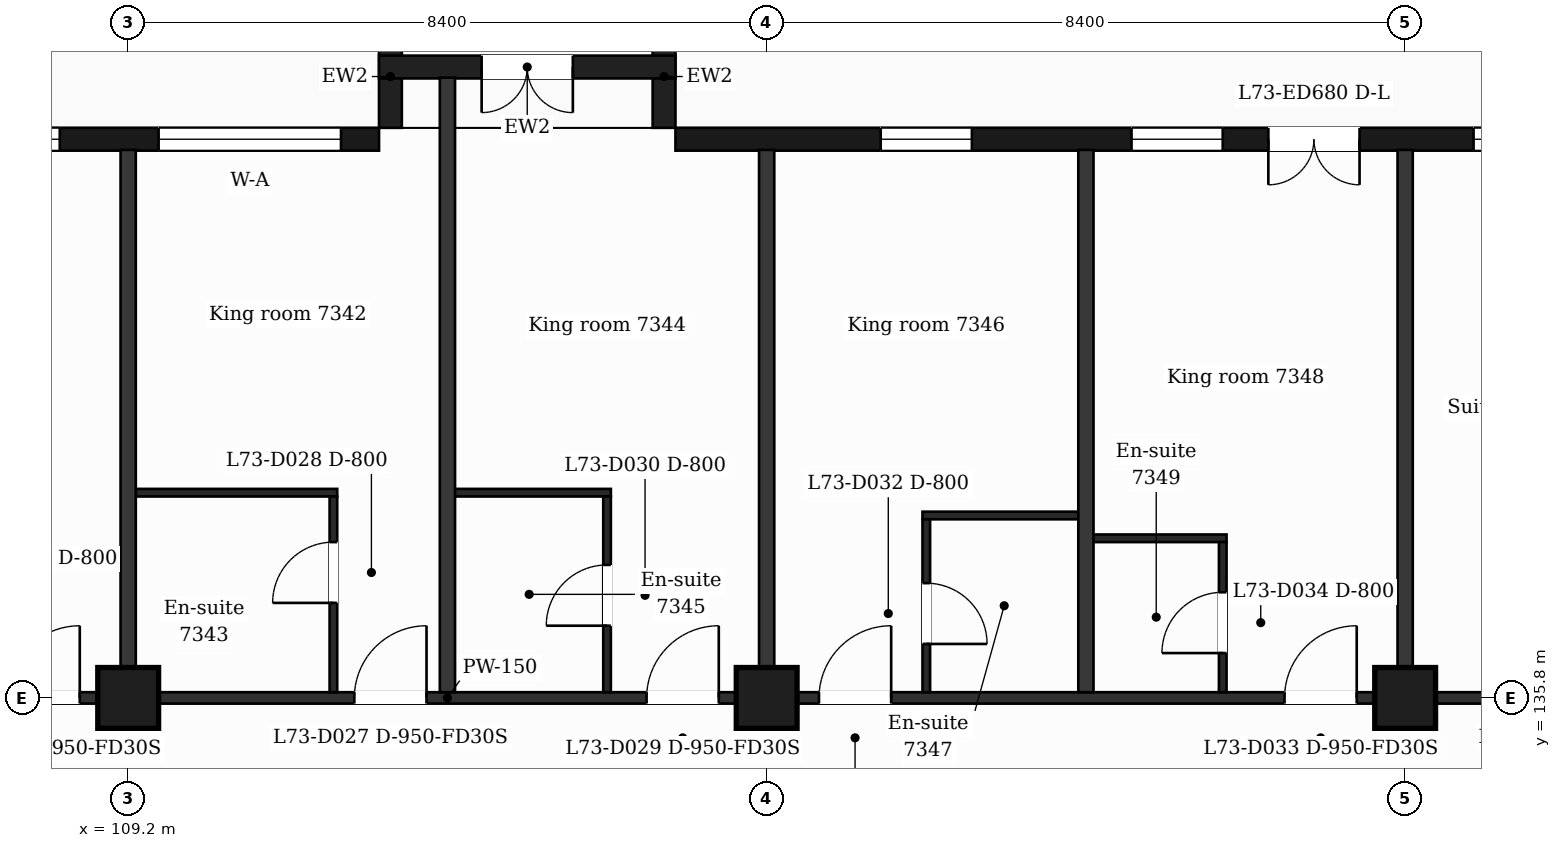
"""IFC4 building model, lengths in metres.
Left out: names, types, materials, properties, quantities, classifications, styles, units other than length and angle.
Written with IfcOpenShell. Run it as: python <this file> out.ifc"""

import sys

from ifc_helpers import new_model, si_unit, direction, frame, frame_2d, origin, origin_2d, place, context, subcontext, project, spatial, rectangle, extrude, element, fill, save


model = new_model("IFC4")
c1 = context("Model", 3, precision=1e-05, world=origin(), true_north=direction((0.0, 1.0)))
c2 = subcontext(c1, "Body", "Model", "MODEL_VIEW")
j1 = project(units=[si_unit("LENGTHUNIT", "METRE"), si_unit("PLANEANGLEUNIT", "RADIAN")], contexts=[c1])
p1 = place(None, origin())
s1 = spatial("IfcSite", under=j1, at=p1, CompositionType="ELEMENT")
p2 = place(p1, origin())
s2 = spatial("IfcBuilding", under=s1, at=p2, CompositionType="ELEMENT")
p3 = place(p2, frame((0.0, 0.0, 299.7)))
s3 = spatial("IfcBuildingStorey", under=s2, at=p3, CompositionType="ELEMENT", Elevation=299.7)
for number, where, z_axis, x_axis in (
    (1, (109.2, 135.8, 0.0), (0.0, 0.0, 1.0), (1.0, 0.0, 0.0)),
    (2, (117.6, 135.8, 0.0), (0.0, 0.0, 1.0), (1.0, 0.0, 0.0)),
    (3, (126.0, 135.8, 0.0), (0.0, 0.0, 1.0), (1.0, 0.0, 0.0)),
):
    element("IfcColumn", number, at=place(p3, frame(where, z_axis=z_axis, x_axis=x_axis)), inside=s3, PredefinedType="COLUMN", context=c2, shape_type="SweptSolid", body=[
        extrude(rectangle(XDim=0.8, YDim=0.8, at=origin_2d()), origin(), (0.0, 0.0, 1.0), 3.7),
    ])
p4 = place(p3, frame((130.65, 143.15, 0.0), z_axis=(0.0, 0.0, 1.0), x_axis=(-1.0, 0.0, 0.0)))
e4 = element("IfcWall", 4, at=p4, inside=s3, PredefinedType="SOLIDWALL", context=c2, shape_type="SweptSolid", body=[
    extrude(rectangle(XDim=14.25, YDim=0.3, at=frame_2d((7.125, 0.0))), origin(), (0.0, 0.0, 1.0), 3.25),
])
p5 = place(p4, frame((1.35, 0.0, 0.9)))
e5 = element("IfcOpeningElement", 5, at=p5, cuts=e4, PredefinedType="OPENING", context=c2, shape_type="SweptSolid", body=[
    extrude(rectangle(XDim=2.4, YDim=2.1, at=frame_2d((1.2, 1.05))), frame((0.0, 0.16, 0.0), z_axis=(0.0, -1.0, 0.0), x_axis=(1.0, 0.0, 0.0)), (0.0, 0.0, 1.0), 0.32),
])
p6 = place(p4, frame((5.25, 0.0, 0.0)))
e6 = element("IfcOpeningElement", 6, at=p6, cuts=e4, PredefinedType="OPENING", context=c2, shape_type="SweptSolid", body=[
    extrude(rectangle(XDim=1.2, YDim=2.4, at=frame_2d((0.6, 1.2))), frame((0.0, 0.16, 0.0), z_axis=(0.0, -1.0, 0.0), x_axis=(1.0, 0.0, 0.0)), (0.0, 0.0, 1.0), 0.32),
])
p7 = place(p4, frame((7.05, 0.0, 0.9)))
e7 = element("IfcOpeningElement", 7, at=p7, cuts=e4, PredefinedType="OPENING", context=c2, shape_type="SweptSolid", body=[
    extrude(rectangle(XDim=1.2, YDim=2.1, at=frame_2d((0.6, 1.05))), frame((0.0, 0.16, 0.0), z_axis=(0.0, -1.0, 0.0), x_axis=(1.0, 0.0, 0.0)), (0.0, 0.0, 1.0), 0.32),
])
p8 = place(p4, frame((10.35, 0.0, 0.9)))
e8 = element("IfcOpeningElement", 8, at=p8, cuts=e4, PredefinedType="OPENING", context=c2, shape_type="SweptSolid", body=[
    extrude(rectangle(XDim=1.2, YDim=2.1, at=frame_2d((0.6, 1.05))), frame((0.0, 0.16, 0.0), z_axis=(0.0, -1.0, 0.0), x_axis=(1.0, 0.0, 0.0)), (0.0, 0.0, 1.0), 0.32),
])
p9 = place(p3, frame((112.5, 143.15, 0.0), z_axis=(0.0, 0.0, 1.0), x_axis=(-1.0, 0.0, 0.0)))
e9 = element("IfcWall", 9, at=p9, inside=s3, PredefinedType="SOLIDWALL", context=c2, shape_type="SweptSolid", body=[
    extrude(rectangle(XDim=16.5, YDim=0.3, at=frame_2d((8.25, 0.0))), origin(), (0.0, 0.0, 1.0), 3.25),
])
p10 = place(p9, frame((0.5, 0.0, 0.9)))
e10 = element("IfcOpeningElement", 10, at=p10, cuts=e9, PredefinedType="OPENING", context=c2, shape_type="SweptSolid", body=[
    extrude(rectangle(XDim=2.4, YDim=2.1, at=frame_2d((1.2, 1.05))), frame((0.0, 0.16, 0.0), z_axis=(0.0, -1.0, 0.0), x_axis=(1.0, 0.0, 0.0)), (0.0, 0.0, 1.0), 0.32),
])
p11 = place(p9, frame((4.2, 0.0, 0.9)))
e11 = element("IfcOpeningElement", 11, at=p11, cuts=e9, PredefinedType="OPENING", context=c2, shape_type="SweptSolid", body=[
    extrude(rectangle(XDim=2.4, YDim=2.1, at=frame_2d((1.2, 1.05))), frame((0.0, 0.16, 0.0), z_axis=(0.0, -1.0, 0.0), x_axis=(1.0, 0.0, 0.0)), (0.0, 0.0, 1.0), 0.32),
])
p12 = place(p9, frame((9.0, 0.0, 0.0)))
e12 = element("IfcOpeningElement", 12, at=p12, cuts=e9, PredefinedType="OPENING", context=c2, shape_type="SweptSolid", body=[
    extrude(rectangle(XDim=1.2, YDim=2.4, at=frame_2d((0.6, 1.2))), frame((0.0, 0.16, 0.0), z_axis=(0.0, -1.0, 0.0), x_axis=(1.0, 0.0, 0.0)), (0.0, 0.0, 1.0), 0.32),
])
p13 = place(p9, frame((12.6, 0.0, 0.9)))
e13 = element("IfcOpeningElement", 13, at=p13, cuts=e9, PredefinedType="OPENING", context=c2, shape_type="SweptSolid", body=[
    extrude(rectangle(XDim=2.4, YDim=2.1, at=frame_2d((1.2, 1.05))), frame((0.0, 0.16, 0.0), z_axis=(0.0, -1.0, 0.0), x_axis=(1.0, 0.0, 0.0)), (0.0, 0.0, 1.0), 0.32),
])
for number, where, z_axis, x_axis in (
    (14, (116.25, 143.3, 0.0), (0.0, 0.0, 1.0), (0.0, 1.0, 0.0)),
    (15, (112.65, 143.3, 0.0), (0.0, 0.0, 1.0), (0.0, 1.0, 0.0)),
):
    element("IfcWall", number, at=place(p3, frame(where, z_axis=z_axis, x_axis=x_axis)), inside=s3, PredefinedType="SOLIDWALL", context=c2, shape_type="SweptSolid", body=[
        extrude(rectangle(XDim=1.35, YDim=0.3, at=frame_2d((0.675, 0.0))), origin(), (0.0, 0.0, 1.0), 3.25),
    ])
p14 = place(p3, frame((116.4, 144.1, 0.0), z_axis=(0.0, 0.0, 1.0), x_axis=(-1.0, 0.0, 0.0)))
e16 = element("IfcWall", 16, at=p14, inside=s3, PredefinedType="SOLIDWALL", context=c2, shape_type="SweptSolid", body=[
    extrude(rectangle(XDim=3.9, YDim=0.3, at=frame_2d((1.95, 0.0))), origin(), (0.0, 0.0, 1.0), 3.25),
])
p15 = place(p14, frame((1.35, 0.0, 0.0)))
e17 = element("IfcOpeningElement", 17, at=p15, cuts=e16, PredefinedType="OPENING", context=c2, shape_type="SweptSolid", body=[
    extrude(rectangle(XDim=1.2, YDim=2.4, at=frame_2d((0.6, 1.2))), frame((0.0, 0.16, 0.0), z_axis=(0.0, -1.0, 0.0), x_axis=(1.0, 0.0, 0.0)), (0.0, 0.0, 1.0), 0.32),
])
p16 = place(p3, frame((90.895, 135.8, 0.0), z_axis=(0.0, 0.0, 1.0), x_axis=(1.0, 0.0, 0.0)))
e18 = element("IfcWall", 18, at=p16, inside=s3, PredefinedType="PARTITIONING", context=c2, shape_type="SweptSolid", body=[
    extrude(rectangle(XDim=45.011, YDim=0.15, at=frame_2d((22.505, 0.0))), origin(), (0.0, 0.0, 1.0), 3.25),
])
p17 = place(p16, frame((6.906, 0.0, 0.0)))
e19 = element("IfcOpeningElement", 19, at=p17, cuts=e18, PredefinedType="OPENING", context=c2, shape_type="SweptSolid", body=[
    extrude(rectangle(XDim=1.0, YDim=2.1, at=frame_2d((0.5, 1.05))), frame((0.0, 0.085, 0.0), z_axis=(0.0, -1.0, 0.0), x_axis=(1.0, 0.0, 0.0)), (0.0, 0.0, 1.0), 0.17),
])
p18 = place(p16, frame((10.555, 0.0, 0.0)))
e20 = element("IfcOpeningElement", 20, at=p18, cuts=e18, PredefinedType="OPENING", context=c2, shape_type="SweptSolid", body=[
    extrude(rectangle(XDim=1.0, YDim=2.1, at=frame_2d((0.5, 1.05))), frame((0.0, 0.085, 0.0), z_axis=(0.0, -1.0, 0.0), x_axis=(1.0, 0.0, 0.0)), (0.0, 0.0, 1.0), 0.17),
])
p19 = place(p16, frame((16.719, 0.0, 0.0)))
e21 = element("IfcOpeningElement", 21, at=p19, cuts=e18, PredefinedType="OPENING", context=c2, shape_type="SweptSolid", body=[
    extrude(rectangle(XDim=0.95, YDim=2.1, at=frame_2d((0.475, 1.05))), frame((0.0, 0.085, 0.0), z_axis=(0.0, -1.0, 0.0), x_axis=(1.0, 0.0, 0.0)), (0.0, 0.0, 1.0), 0.17),
])
p20 = place(p16, frame((21.281, 0.0, 0.0)))
e22 = element("IfcOpeningElement", 22, at=p20, cuts=e18, PredefinedType="OPENING", context=c2, shape_type="SweptSolid", body=[
    extrude(rectangle(XDim=0.95, YDim=2.1, at=frame_2d((0.475, 1.05))), frame((0.0, 0.085, 0.0), z_axis=(0.0, -1.0, 0.0), x_axis=(1.0, 0.0, 0.0)), (0.0, 0.0, 1.0), 0.17),
])
p21 = place(p16, frame((25.125, 0.0, 0.0)))
e23 = element("IfcOpeningElement", 23, at=p21, cuts=e18, PredefinedType="OPENING", context=c2, shape_type="SweptSolid", body=[
    extrude(rectangle(XDim=0.95, YDim=2.1, at=frame_2d((0.475, 1.05))), frame((0.0, 0.085, 0.0), z_axis=(0.0, -1.0, 0.0), x_axis=(1.0, 0.0, 0.0)), (0.0, 0.0, 1.0), 0.17),
])
p22 = place(p16, frame((27.393, 0.0, 0.0)))
e24 = element("IfcOpeningElement", 24, at=p22, cuts=e18, PredefinedType="OPENING", context=c2, shape_type="SweptSolid", body=[
    extrude(rectangle(XDim=0.95, YDim=2.1, at=frame_2d((0.475, 1.05))), frame((0.0, 0.085, 0.0), z_axis=(0.0, -1.0, 0.0), x_axis=(1.0, 0.0, 0.0)), (0.0, 0.0, 1.0), 0.17),
])
p23 = place(p16, frame((33.518, 0.0, 0.0)))
e25 = element("IfcOpeningElement", 25, at=p23, cuts=e18, PredefinedType="OPENING", context=c2, shape_type="SweptSolid", body=[
    extrude(rectangle(XDim=0.95, YDim=2.1, at=frame_2d((0.475, 1.05))), frame((0.0, 0.085, 0.0), z_axis=(0.0, -1.0, 0.0), x_axis=(1.0, 0.0, 0.0)), (0.0, 0.0, 1.0), 0.17),
])
p24 = place(p16, frame((37.195, 0.0, 0.0)))
e26 = element("IfcOpeningElement", 26, at=p24, cuts=e18, PredefinedType="OPENING", context=c2, shape_type="SweptSolid", body=[
    extrude(rectangle(XDim=1.0, YDim=2.1, at=frame_2d((0.5, 1.05))), frame((0.0, 0.085, 0.0), z_axis=(0.0, -1.0, 0.0), x_axis=(1.0, 0.0, 0.0)), (0.0, 0.0, 1.0), 0.17),
])
p25 = place(p3, frame((121.8, 137.9, 0.0), z_axis=(0.0, 0.0, 1.0), x_axis=(1.0, 0.0, 0.0)))
e27 = element("IfcWall", 27, at=p25, inside=s3, PredefinedType="PARTITIONING", context=c2, shape_type="SweptSolid", body=[
    extrude(rectangle(XDim=1.85, YDim=0.1, at=frame_2d((0.925, 0.0))), origin(), (0.0, 0.0, 1.0), 3.25),
])
p26 = place(p3, frame((119.65, 138.2, 0.0), z_axis=(0.0, 0.0, 1.0), x_axis=(1.0, 0.0, 0.0)))
e28 = element("IfcWall", 28, at=p26, inside=s3, PredefinedType="PARTITIONING", context=c2, shape_type="SweptSolid", body=[
    extrude(rectangle(XDim=2.15, YDim=0.1, at=frame_2d((1.075, 0.0))), origin(), (0.0, 0.0, 1.0), 3.25),
])
p27 = place(p3, frame((109.2, 138.5, 0.0), z_axis=(0.0, 0.0, 1.0), x_axis=(1.0, 0.0, 0.0)))
e29 = element("IfcWall", 29, at=p27, inside=s3, PredefinedType="PARTITIONING", context=c2, shape_type="SweptSolid", body=[
    extrude(rectangle(XDim=2.75, YDim=0.1, at=frame_2d((1.375, 0.0))), origin(), (0.0, 0.0, 1.0), 3.25),
])
p28 = place(p3, frame((113.4, 138.5, 0.0), z_axis=(0.0, 0.0, 1.0), x_axis=(1.0, 0.0, 0.0)))
e30 = element("IfcWall", 30, at=p28, inside=s3, PredefinedType="PARTITIONING", context=c2, shape_type="SweptSolid", body=[
    extrude(rectangle(XDim=2.15, YDim=0.1, at=frame_2d((1.075, 0.0))), origin(), (0.0, 0.0, 1.0), 3.25),
])
p29 = place(p3, frame((109.2, 135.875, 0.0), z_axis=(0.0, 0.0, 1.0), x_axis=(0.0, 1.0, 0.0)))
e31 = element("IfcWall", 31, at=p29, inside=s3, PredefinedType="PARTITIONING", context=c2, shape_type="SweptSolid", body=[
    extrude(rectangle(XDim=7.135, YDim=0.2, at=frame_2d((3.567, 0.0))), origin(), (0.0, 0.0, 1.0), 3.25),
])
p30 = place(p3, frame((111.9, 135.875, 0.0), z_axis=(0.0, 0.0, 1.0), x_axis=(0.0, 1.0, 0.0)))
e32 = element("IfcWall", 32, at=p30, inside=s3, PredefinedType="PARTITIONING", context=c2, shape_type="SweptSolid", body=[
    extrude(rectangle(XDim=2.575, YDim=0.1, at=frame_2d((1.288, 0.0))), origin(), (0.0, 0.0, 1.0), 3.25),
])
p31 = place(p30, frame((1.175, 0.0, 0.0)))
e33 = element("IfcOpeningElement", 33, at=p31, cuts=e32, PredefinedType="OPENING", context=c2, shape_type="SweptSolid", body=[
    extrude(rectangle(XDim=0.8, YDim=2.1, at=frame_2d((0.4, 1.05))), frame((0.0, 0.06, 0.0), z_axis=(0.0, -1.0, 0.0), x_axis=(1.0, 0.0, 0.0)), (0.0, 0.0, 1.0), 0.12),
])
p32 = place(p3, frame((113.4, 135.875, 0.0), z_axis=(0.0, 0.0, 1.0), x_axis=(0.0, 1.0, 0.0)))
e34 = element("IfcWall", 34, at=p32, inside=s3, PredefinedType="PARTITIONING", context=c2, shape_type="SweptSolid", body=[
    extrude(rectangle(XDim=8.085, YDim=0.2, at=frame_2d((4.042, 0.0))), origin(), (0.0, 0.0, 1.0), 3.25),
])
p33 = place(p3, frame((115.5, 135.875, 0.0), z_axis=(0.0, 0.0, 1.0), x_axis=(0.0, 1.0, 0.0)))
e35 = element("IfcWall", 35, at=p33, inside=s3, PredefinedType="PARTITIONING", context=c2, shape_type="SweptSolid", body=[
    extrude(rectangle(XDim=2.575, YDim=0.1, at=frame_2d((1.288, 0.0))), origin(), (0.0, 0.0, 1.0), 3.25),
])
p34 = place(p33, frame((0.875, 0.0, 0.0)))
e36 = element("IfcOpeningElement", 36, at=p34, cuts=e35, PredefinedType="OPENING", context=c2, shape_type="SweptSolid", body=[
    extrude(rectangle(XDim=0.8, YDim=2.1, at=frame_2d((0.4, 1.05))), frame((0.0, 0.06, 0.0), z_axis=(0.0, -1.0, 0.0), x_axis=(1.0, 0.0, 0.0)), (0.0, 0.0, 1.0), 0.12),
])
p35 = place(p3, frame((117.6, 135.875, 0.0), z_axis=(0.0, 0.0, 1.0), x_axis=(0.0, 1.0, 0.0)))
e37 = element("IfcWall", 37, at=p35, inside=s3, PredefinedType="PARTITIONING", context=c2, shape_type="SweptSolid", body=[
    extrude(rectangle(XDim=7.135, YDim=0.2, at=frame_2d((3.567, 0.0))), origin(), (0.0, 0.0, 1.0), 3.25),
])
p36 = place(p3, frame((119.7, 135.875, 0.0), z_axis=(0.0, 0.0, 1.0), x_axis=(0.0, 1.0, 0.0)))
e38 = element("IfcWall", 38, at=p36, inside=s3, PredefinedType="PARTITIONING", context=c2, shape_type="SweptSolid", body=[
    extrude(rectangle(XDim=2.275, YDim=0.1, at=frame_2d((1.137, 0.0))), origin(), (0.0, 0.0, 1.0), 3.25),
])
p37 = place(p36, frame((0.635, 0.0, 0.0)))
e39 = element("IfcOpeningElement", 39, at=p37, cuts=e38, PredefinedType="OPENING", context=c2, shape_type="SweptSolid", body=[
    extrude(rectangle(XDim=0.8, YDim=2.1, at=frame_2d((0.4, 1.05))), frame((0.0, 0.06, 0.0), z_axis=(0.0, -1.0, 0.0), x_axis=(1.0, 0.0, 0.0)), (0.0, 0.0, 1.0), 0.12),
])
p38 = place(p3, frame((121.8, 135.875, 0.0), z_axis=(0.0, 0.0, 1.0), x_axis=(0.0, 1.0, 0.0)))
e40 = element("IfcWall", 40, at=p38, inside=s3, PredefinedType="PARTITIONING", context=c2, shape_type="SweptSolid", body=[
    extrude(rectangle(XDim=7.135, YDim=0.2, at=frame_2d((3.567, 0.0))), origin(), (0.0, 0.0, 1.0), 3.25),
])
p39 = place(p3, frame((123.6, 135.875, 0.0), z_axis=(0.0, 0.0, 1.0), x_axis=(0.0, 1.0, 0.0)))
e41 = element("IfcWall", 41, at=p39, inside=s3, PredefinedType="PARTITIONING", context=c2, shape_type="SweptSolid", body=[
    extrude(rectangle(XDim=1.975, YDim=0.1, at=frame_2d((0.988, 0.0))), origin(), (0.0, 0.0, 1.0), 3.25),
])
p40 = place(p39, frame((0.515, 0.0, 0.0)))
e42 = element("IfcOpeningElement", 42, at=p40, cuts=e41, PredefinedType="OPENING", context=c2, shape_type="SweptSolid", body=[
    extrude(rectangle(XDim=0.8, YDim=2.1, at=frame_2d((0.4, 1.05))), frame((0.0, 0.06, 0.0), z_axis=(0.0, -1.0, 0.0), x_axis=(1.0, 0.0, 0.0)), (0.0, 0.0, 1.0), 0.12),
])
p41 = place(p3, frame((126.0, 135.875, 0.0), z_axis=(0.0, 0.0, 1.0), x_axis=(0.0, 1.0, 0.0)))
e43 = element("IfcWall", 43, at=p41, inside=s3, PredefinedType="PARTITIONING", context=c2, shape_type="SweptSolid", body=[
    extrude(rectangle(XDim=7.135, YDim=0.2, at=frame_2d((3.567, 0.0))), origin(), (0.0, 0.0, 1.0), 3.25),
])
p42 = place(p5, origin())
e44 = element("IfcWindow", 44, at=p42, inside=s3, PartitioningType="SINGLE_PANEL", PredefinedType="WINDOW", context=c2, shape_type="SweptSolid", body=[
    extrude(rectangle(XDim=2.4, YDim=2.1, at=frame_2d((1.2, 1.05))), frame((0.0, 0.03, 0.0), z_axis=(0.0, -1.0, 0.0), x_axis=(1.0, 0.0, 0.0)), (0.0, 0.0, 1.0), 0.06),
])
fill(e5, e44)
p43 = place(p6, origin())
e45 = element("IfcDoor", 45, at=p43, inside=s3, OperationType="DOUBLE_DOOR_SINGLE_SWING", PredefinedType="DOOR", context=c2, shape_type="SweptSolid", body=[
    extrude(rectangle(XDim=1.2, YDim=2.4, at=frame_2d((0.6, 1.2))), frame((0.0, 0.025, 0.0), z_axis=(0.0, -1.0, 0.0), x_axis=(1.0, 0.0, 0.0)), (0.0, 0.0, 1.0), 0.05),
])
fill(e6, e45)
p44 = place(p7, origin())
e46 = element("IfcWindow", 46, at=p44, inside=s3, PartitioningType="SINGLE_PANEL", PredefinedType="WINDOW", context=c2, shape_type="SweptSolid", body=[
    extrude(rectangle(XDim=1.2, YDim=2.1, at=frame_2d((0.6, 1.05))), frame((0.0, 0.03, 0.0), z_axis=(0.0, -1.0, 0.0), x_axis=(1.0, 0.0, 0.0)), (0.0, 0.0, 1.0), 0.06),
])
fill(e7, e46)
p45 = place(p8, origin())
e47 = element("IfcWindow", 47, at=p45, inside=s3, PartitioningType="SINGLE_PANEL", PredefinedType="WINDOW", context=c2, shape_type="SweptSolid", body=[
    extrude(rectangle(XDim=1.2, YDim=2.1, at=frame_2d((0.6, 1.05))), frame((0.0, 0.03, 0.0), z_axis=(0.0, -1.0, 0.0), x_axis=(1.0, 0.0, 0.0)), (0.0, 0.0, 1.0), 0.06),
])
fill(e8, e47)
p46 = place(p10, origin())
e48 = element("IfcWindow", 48, at=p46, inside=s3, PartitioningType="SINGLE_PANEL", PredefinedType="WINDOW", context=c2, shape_type="SweptSolid", body=[
    extrude(rectangle(XDim=2.4, YDim=2.1, at=frame_2d((1.2, 1.05))), frame((0.0, 0.03, 0.0), z_axis=(0.0, -1.0, 0.0), x_axis=(1.0, 0.0, 0.0)), (0.0, 0.0, 1.0), 0.06),
])
fill(e10, e48)
p47 = place(p11, origin())
e49 = element("IfcWindow", 49, at=p47, inside=s3, PartitioningType="SINGLE_PANEL", PredefinedType="WINDOW", context=c2, shape_type="SweptSolid", body=[
    extrude(rectangle(XDim=2.4, YDim=2.1, at=frame_2d((1.2, 1.05))), frame((0.0, 0.03, 0.0), z_axis=(0.0, -1.0, 0.0), x_axis=(1.0, 0.0, 0.0)), (0.0, 0.0, 1.0), 0.06),
])
fill(e11, e49)
p48 = place(p15, origin())
e50 = element("IfcDoor", 50, at=p48, inside=s3, OperationType="DOUBLE_DOOR_SINGLE_SWING", PredefinedType="DOOR", context=c2, shape_type="SweptSolid", body=[
    extrude(rectangle(XDim=1.2, YDim=2.4, at=frame_2d((0.6, 1.2))), frame((0.0, 0.025, 0.0), z_axis=(0.0, -1.0, 0.0), x_axis=(1.0, 0.0, 0.0)), (0.0, 0.0, 1.0), 0.05),
])
fill(e17, e50)
p49 = place(p19, origin())
e51 = element("IfcDoor", 51, at=p49, inside=s3, OperationType="SINGLE_SWING_RIGHT", PredefinedType="DOOR", context=c2, shape_type="SweptSolid", body=[
    extrude(rectangle(XDim=0.95, YDim=2.1, at=frame_2d((0.475, 1.05))), frame((0.0, 0.025, 0.0), z_axis=(0.0, -1.0, 0.0), x_axis=(1.0, 0.0, 0.0)), (0.0, 0.0, 1.0), 0.05),
])
fill(e21, e51)
p50 = place(p20, origin())
e52 = element("IfcDoor", 52, at=p50, inside=s3, OperationType="SINGLE_SWING_RIGHT", PredefinedType="DOOR", context=c2, shape_type="SweptSolid", body=[
    extrude(rectangle(XDim=0.95, YDim=2.1, at=frame_2d((0.475, 1.05))), frame((0.0, 0.025, 0.0), z_axis=(0.0, -1.0, 0.0), x_axis=(1.0, 0.0, 0.0)), (0.0, 0.0, 1.0), 0.05),
])
fill(e22, e52)
p51 = place(p31, origin())
e53 = element("IfcDoor", 53, at=p51, inside=s3, OperationType="SINGLE_SWING_LEFT", PredefinedType="DOOR", context=c2, shape_type="SweptSolid", body=[
    extrude(rectangle(XDim=0.8, YDim=2.1, at=frame_2d((0.4, 1.05))), frame((0.0, 0.025, 0.0), z_axis=(0.0, -1.0, 0.0), x_axis=(1.0, 0.0, 0.0)), (0.0, 0.0, 1.0), 0.05),
])
fill(e33, e53)
p52 = place(p21, origin())
e54 = element("IfcDoor", 54, at=p52, inside=s3, OperationType="SINGLE_SWING_RIGHT", PredefinedType="DOOR", context=c2, shape_type="SweptSolid", body=[
    extrude(rectangle(XDim=0.95, YDim=2.1, at=frame_2d((0.475, 1.05))), frame((0.0, 0.025, 0.0), z_axis=(0.0, -1.0, 0.0), x_axis=(1.0, 0.0, 0.0)), (0.0, 0.0, 1.0), 0.05),
])
fill(e23, e54)
p53 = place(p34, origin())
e55 = element("IfcDoor", 55, at=p53, inside=s3, OperationType="SINGLE_SWING_LEFT", PredefinedType="DOOR", context=c2, shape_type="SweptSolid", body=[
    extrude(rectangle(XDim=0.8, YDim=2.1, at=frame_2d((0.4, 1.05))), frame((0.0, 0.025, 0.0), z_axis=(0.0, -1.0, 0.0), x_axis=(1.0, 0.0, 0.0)), (0.0, 0.0, 1.0), 0.05),
])
fill(e36, e55)
p54 = place(p22, origin())
e56 = element("IfcDoor", 56, at=p54, inside=s3, OperationType="SINGLE_SWING_RIGHT", PredefinedType="DOOR", context=c2, shape_type="SweptSolid", body=[
    extrude(rectangle(XDim=0.95, YDim=2.1, at=frame_2d((0.475, 1.05))), frame((0.0, 0.025, 0.0), z_axis=(0.0, -1.0, 0.0), x_axis=(1.0, 0.0, 0.0)), (0.0, 0.0, 1.0), 0.05),
])
fill(e24, e56)
p55 = place(p37, origin())
e57 = element("IfcDoor", 57, at=p55, inside=s3, OperationType="SINGLE_SWING_LEFT", PredefinedType="DOOR", context=c2, shape_type="SweptSolid", body=[
    extrude(rectangle(XDim=0.8, YDim=2.1, at=frame_2d((0.4, 1.05))), frame((0.0, 0.025, 0.0), z_axis=(0.0, -1.0, 0.0), x_axis=(1.0, 0.0, 0.0)), (0.0, 0.0, 1.0), 0.05),
])
fill(e39, e57)
p56 = place(p23, origin())
e58 = element("IfcDoor", 58, at=p56, inside=s3, OperationType="SINGLE_SWING_RIGHT", PredefinedType="DOOR", context=c2, shape_type="SweptSolid", body=[
    extrude(rectangle(XDim=0.95, YDim=2.1, at=frame_2d((0.475, 1.05))), frame((0.0, 0.025, 0.0), z_axis=(0.0, -1.0, 0.0), x_axis=(1.0, 0.0, 0.0)), (0.0, 0.0, 1.0), 0.05),
])
fill(e25, e58)
p57 = place(p40, origin())
e59 = element("IfcDoor", 59, at=p57, inside=s3, OperationType="SINGLE_SWING_LEFT", PredefinedType="DOOR", context=c2, shape_type="SweptSolid", body=[
    extrude(rectangle(XDim=0.8, YDim=2.1, at=frame_2d((0.4, 1.05))), frame((0.0, 0.025, 0.0), z_axis=(0.0, -1.0, 0.0), x_axis=(1.0, 0.0, 0.0)), (0.0, 0.0, 1.0), 0.05),
])
fill(e42, e59)
save(model, sys.argv[1])
